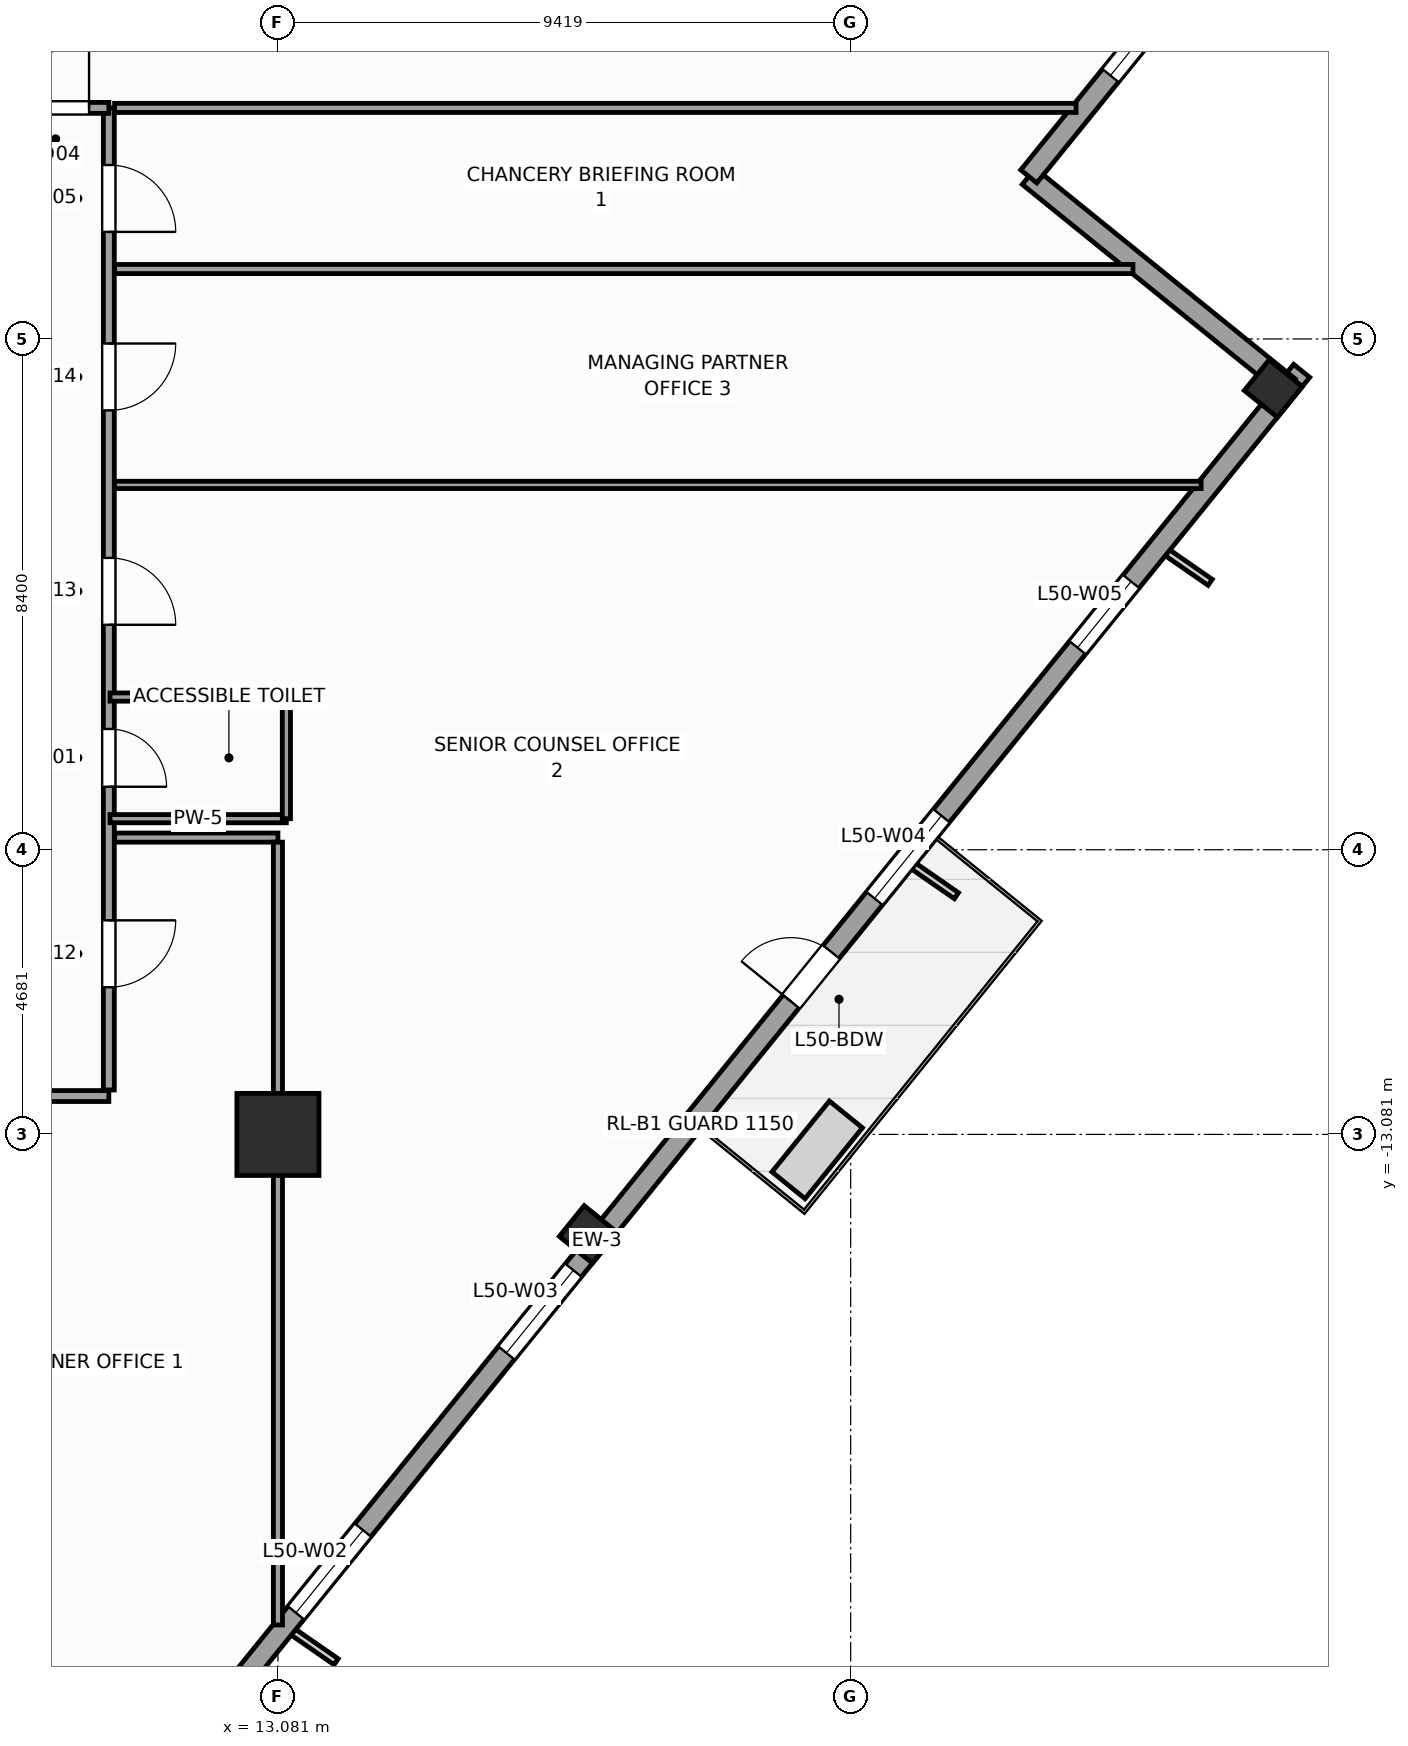
"""IFC4 building model, lengths in metres.
Left out: names, types, materials, properties, quantities, classifications, styles, units other than length and angle.
Written with IfcOpenShell. Run it as: python <this file> out.ifc"""

import sys

from ifc_helpers import new_model, si_unit, direction, frame, frame_2d, origin, origin_2d, place, context, subcontext, project, spatial, rectangle, extrude, source, transform, mapped, element, fill, save


model = new_model("IFC4")
c1 = context("Model", 3, precision=1e-05, world=origin(), true_north=direction((0.0, 1.0)))
c2 = subcontext(c1, "Body", "Model", "MODEL_VIEW")
j1 = project(units=[si_unit("LENGTHUNIT", "METRE"), si_unit("PLANEANGLEUNIT", "RADIAN")], contexts=[c1])
p1 = place(None, origin())
s1 = spatial("IfcSite", under=j1, at=p1, CompositionType="ELEMENT")
p2 = place(p1, origin())
s2 = spatial("IfcBuilding", under=s1, at=p2, CompositionType="ELEMENT")
p3 = place(p2, frame((0.0, 0.0, 209.5)))
s3 = spatial("IfcBuildingStorey", under=s2, at=p3, CompositionType="ELEMENT", Elevation=209.5)
m1 = source(origin(), c2, "Body", "SweptSolid", [
    extrude(rectangle(XDim=1.35, YDim=1.35, at=origin_2d()), origin(), (0.0, 0.0, 1.0), 3.9),
])
p4 = place(p3, frame((13.081, -13.081, 0.0), z_axis=(0.0, 0.0, 1.0), x_axis=(1.0, 0.0, 0.0)))
e1 = element("IfcColumn", 1, at=p4, inside=s3, PredefinedType="COLUMN", context=c2, shape_type="MappedRepresentation", body=[
    mapped(m1, transform((0.0, 0.0, 0.0), scale=1.0)),
])
m2 = source(origin(), c2, "Body", "SweptSolid", [
    extrude(rectangle(XDim=0.65, YDim=0.7, at=origin_2d()), origin(), (0.0, 0.0, 1.0), 3.9),
])
for number, where, z_axis, x_axis in (
    (2, (18.185, -14.726, 0.0), (0.0, 0.0, 1.0), (0.629, 0.777, 0.0)),
    (3, (29.45, -0.815, 0.0), (0.0, 0.0, 1.0), (0.629, 0.777, 0.0)),
):
    element("IfcColumn", number, at=place(p3, frame(where, z_axis=z_axis, x_axis=x_axis)), inside=s3, PredefinedType="COLUMN", context=c2, shape_type="MappedRepresentation", body=[
        mapped(m2, transform((0.0, 0.0, 0.0), scale=1.0)),
    ])
p5 = place(p3, frame((6.733, -29.154, 0.0), z_axis=(0.0, 0.0, 1.0), x_axis=(0.629325378072, 0.77714192302, 0.0)))
e4 = element("IfcWall", 4, at=p5, inside=s3, PredefinedType="STANDARD", context=c2, shape_type="SweptSolid", body=[
    extrude(rectangle(XDim=36.84, YDim=0.34, at=frame_2d((18.42, 0.0))), origin(), (0.0, 0.0, 1.0), 2.96),
])
p6 = place(p5, frame((23.495, 0.0, 0.0)))
e5 = element("IfcOpeningElement", 5, at=p6, cuts=e4, PredefinedType="OPENING", context=c2, shape_type="SweptSolid", body=[
    extrude(rectangle(XDim=1.05, YDim=2.25, at=frame_2d((0.525, 1.125))), frame((0.0, 0.18, 0.0), z_axis=(0.0, -1.0, 0.0), x_axis=(1.0, 0.0, 0.0)), (0.0, 0.0, 1.0), 0.36),
])
p7 = place(p5, frame((3.721, 0.0, 0.48)))
e6 = element("IfcOpeningElement", 6, at=p7, cuts=e4, PredefinedType="OPENING", context=c2, shape_type="SweptSolid", body=[
    extrude(rectangle(XDim=1.4, YDim=2.4, at=frame_2d((0.7, 1.2))), frame((0.0, 0.18, 0.0), z_axis=(0.0, -1.0, 0.0), x_axis=(1.0, 0.0, 0.0)), (0.0, 0.0, 1.0), 0.36),
])
p8 = place(p5, frame((10.559, 0.0, 0.58)))
e7 = element("IfcOpeningElement", 7, at=p8, cuts=e4, PredefinedType="OPENING", context=c2, shape_type="SweptSolid", body=[
    extrude(rectangle(XDim=1.75, YDim=2.3, at=frame_2d((0.875, 1.15))), frame((0.0, 0.18, 0.0), z_axis=(0.0, -1.0, 0.0), x_axis=(1.0, 0.0, 0.0)), (0.0, 0.0, 1.0), 0.36),
])
p9 = place(p5, frame((16.058, 0.0, 0.58)))
e8 = element("IfcOpeningElement", 8, at=p9, cuts=e4, PredefinedType="OPENING", context=c2, shape_type="SweptSolid", body=[
    extrude(rectangle(XDim=1.75, YDim=2.3, at=frame_2d((0.875, 1.15))), frame((0.0, 0.18, 0.0), z_axis=(0.0, -1.0, 0.0), x_axis=(1.0, 0.0, 0.0)), (0.0, 0.0, 1.0), 0.36),
])
p10 = place(p5, frame((25.676, 0.0, 0.58)))
e9 = element("IfcOpeningElement", 9, at=p10, cuts=e4, PredefinedType="OPENING", context=c2, shape_type="SweptSolid", body=[
    extrude(rectangle(XDim=1.75, YDim=2.3, at=frame_2d((0.875, 1.15))), frame((0.0, 0.18, 0.0), z_axis=(0.0, -1.0, 0.0), x_axis=(1.0, 0.0, 0.0)), (0.0, 0.0, 1.0), 0.36),
])
p11 = place(p5, frame((30.982, 0.0, 0.48)))
e10 = element("IfcOpeningElement", 10, at=p11, cuts=e4, PredefinedType="OPENING", context=c2, shape_type="SweptSolid", body=[
    extrude(rectangle(XDim=1.4, YDim=2.4, at=frame_2d((0.7, 1.2))), frame((0.0, 0.18, 0.0), z_axis=(0.0, -1.0, 0.0), x_axis=(1.0, 0.0, 0.0)), (0.0, 0.0, 1.0), 0.36),
])
p12 = place(p3, frame((29.703, -0.789, 0.0), z_axis=(0.0, 0.0, 1.0), x_axis=(-0.77714355312, 0.629323365087, 0.0)))
e11 = element("IfcWall", 11, at=p12, inside=s3, PredefinedType="STANDARD", context=c2, shape_type="SweptSolid", body=[
    extrude(rectangle(XDim=5.5, YDim=0.34, at=frame_2d((2.75, 0.0))), origin(), (0.0, 0.0, 1.0), 3.66),
])
p13 = place(p3, frame((25.429, 2.673, 0.0), z_axis=(0.0, 0.0, 1.0), x_axis=(0.629299794138, 0.777162640055, 0.0)))
e12 = element("IfcWall", 12, at=p13, inside=s3, PredefinedType="STANDARD", context=c2, shape_type="SweptSolid", body=[
    extrude(rectangle(XDim=5.67, YDim=0.34, at=frame_2d((2.835, 0.0))), origin(), (0.0, 0.0, 1.0), 3.66),
])
p14 = place(p13, frame((2.135, 0.0, 0.48)))
e13 = element("IfcOpeningElement", 13, at=p14, cuts=e12, PredefinedType="OPENING", context=c2, shape_type="SweptSolid", body=[
    extrude(rectangle(XDim=1.4, YDim=2.4, at=frame_2d((0.7, 1.2))), frame((0.0, 0.18, 0.0), z_axis=(0.0, -1.0, 0.0), x_axis=(1.0, 0.0, 0.0)), (0.0, 0.0, 1.0), 0.36),
])
p15 = place(p3, frame((-11.45, -12.45, 0.0), z_axis=(0.0, 0.0, 1.0), x_axis=(1.0, 0.0, 0.0)))
e14 = element("IfcWall", 14, at=p15, inside=s3, PredefinedType="PARTITIONING", context=c2, shape_type="SweptSolid", body=[
    extrude(rectangle(XDim=21.75, YDim=0.18, at=frame_2d((10.875, 0.0))), origin(), (0.0, 0.0, 1.0), 3.66),
])
p16 = place(p15, frame((5.411, 0.0, 0.0)))
e15 = element("IfcOpeningElement", 15, at=p16, cuts=e14, PredefinedType="OPENING", context=c2, shape_type="SweptSolid", body=[
    extrude(rectangle(XDim=0.95, YDim=2.1, at=frame_2d((0.475, 1.05))), frame((0.0, 0.1, 0.0), z_axis=(0.0, -1.0, 0.0), x_axis=(1.0, 0.0, 0.0)), (0.0, 0.0, 1.0), 0.2),
])
p17 = place(p15, frame((1.839, 0.0, 0.0)))
e16 = element("IfcOpeningElement", 16, at=p17, cuts=e14, PredefinedType="OPENING", context=c2, shape_type="SweptSolid", body=[
    extrude(rectangle(XDim=1.1, YDim=2.2, at=frame_2d((0.55, 1.1))), frame((0.0, 0.1, 0.0), z_axis=(0.0, -1.0, 0.0), x_axis=(1.0, 0.0, 0.0)), (0.0, 0.0, 1.0), 0.2),
])
p18 = place(p15, frame((7.574, 0.0, 0.0)))
e17 = element("IfcOpeningElement", 17, at=p18, cuts=e14, PredefinedType="OPENING", context=c2, shape_type="SweptSolid", body=[
    extrude(rectangle(XDim=1.1, YDim=2.2, at=frame_2d((0.55, 1.1))), frame((0.0, 0.1, 0.0), z_axis=(0.0, -1.0, 0.0), x_axis=(1.0, 0.0, 0.0)), (0.0, 0.0, 1.0), 0.2),
])
p19 = place(p15, frame((11.05, 0.0, 0.0)))
e18 = element("IfcOpeningElement", 18, at=p19, cuts=e14, PredefinedType="OPENING", context=c2, shape_type="SweptSolid", body=[
    extrude(rectangle(XDim=1.1, YDim=2.2, at=frame_2d((0.55, 1.1))), frame((0.0, 0.1, 0.0), z_axis=(0.0, -1.0, 0.0), x_axis=(1.0, 0.0, 0.0)), (0.0, 0.0, 1.0), 0.2),
])
p20 = place(p15, frame((15.65, 0.0, 0.0)))
e19 = element("IfcOpeningElement", 19, at=p20, cuts=e14, PredefinedType="OPENING", context=c2, shape_type="SweptSolid", body=[
    extrude(rectangle(XDim=1.1, YDim=2.2, at=frame_2d((0.55, 1.1))), frame((0.0, 0.1, 0.0), z_axis=(0.0, -1.0, 0.0), x_axis=(1.0, 0.0, 0.0)), (0.0, 0.0, 1.0), 0.2),
])
p21 = place(p3, frame((10.3, -12.35, 0.0), z_axis=(0.0, 0.0, 1.0), x_axis=(0.0, 1.0, 0.0)))
e20 = element("IfcWall", 20, at=p21, inside=s3, PredefinedType="PARTITIONING", context=c2, shape_type="SweptSolid", body=[
    extrude(rectangle(XDim=16.15, YDim=0.18, at=frame_2d((8.075, 0.0))), origin(), (0.0, 0.0, 1.0), 3.66),
])
p22 = place(p21, frame((4.986, 0.0, 0.0)))
e21 = element("IfcOpeningElement", 21, at=p22, cuts=e20, PredefinedType="OPENING", context=c2, shape_type="SweptSolid", body=[
    extrude(rectangle(XDim=0.95, YDim=2.1, at=frame_2d((0.475, 1.05))), frame((0.0, 0.1, 0.0), z_axis=(0.0, -1.0, 0.0), x_axis=(1.0, 0.0, 0.0)), (0.0, 0.0, 1.0), 0.2),
])
p23 = place(p21, frame((14.111, 0.0, 0.0)))
e22 = element("IfcOpeningElement", 22, at=p23, cuts=e20, PredefinedType="OPENING", context=c2, shape_type="SweptSolid", body=[
    extrude(rectangle(XDim=1.1, YDim=2.2, at=frame_2d((0.55, 1.1))), frame((0.0, 0.1, 0.0), z_axis=(0.0, -1.0, 0.0), x_axis=(1.0, 0.0, 0.0)), (0.0, 0.0, 1.0), 0.2),
])
p24 = place(p21, frame((1.689, 0.0, 0.0)))
e23 = element("IfcOpeningElement", 23, at=p24, cuts=e20, PredefinedType="OPENING", context=c2, shape_type="SweptSolid", body=[
    extrude(rectangle(XDim=1.1, YDim=2.2, at=frame_2d((0.55, 1.1))), frame((0.0, 0.1, 0.0), z_axis=(0.0, -1.0, 0.0), x_axis=(1.0, 0.0, 0.0)), (0.0, 0.0, 1.0), 0.2),
])
p25 = place(p21, frame((7.65, 0.0, 0.0)))
e24 = element("IfcOpeningElement", 24, at=p25, cuts=e20, PredefinedType="OPENING", context=c2, shape_type="SweptSolid", body=[
    extrude(rectangle(XDim=1.1, YDim=2.2, at=frame_2d((0.55, 1.1))), frame((0.0, 0.1, 0.0), z_axis=(0.0, -1.0, 0.0), x_axis=(1.0, 0.0, 0.0)), (0.0, 0.0, 1.0), 0.2),
])
p26 = place(p21, frame((11.175, 0.0, 0.0)))
e25 = element("IfcOpeningElement", 25, at=p26, cuts=e20, PredefinedType="OPENING", context=c2, shape_type="SweptSolid", body=[
    extrude(rectangle(XDim=1.1, YDim=2.2, at=frame_2d((0.55, 1.1))), frame((0.0, 0.1, 0.0), z_axis=(0.0, -1.0, 0.0), x_axis=(1.0, 0.0, 0.0)), (0.0, 0.0, 1.0), 0.2),
])
p27 = place(p3, frame((8.55, 3.8, 0.0), z_axis=(0.0, 0.0, 1.0), x_axis=(1.0, 0.0, 0.0)))
e26 = element("IfcWall", 26, at=p27, inside=s3, PredefinedType="PARTITIONING", context=c2, shape_type="SweptSolid", body=[
    extrude(rectangle(XDim=1.75, YDim=0.18, at=frame_2d((0.875, 0.0))), origin(), (0.0, 0.0, 1.0), 3.66),
])
p28 = place(p27, frame((0.325, 0.0, 0.0)))
e27 = element("IfcOpeningElement", 27, at=p28, cuts=e26, PredefinedType="OPENING", context=c2, shape_type="SweptSolid", body=[
    extrude(rectangle(XDim=1.1, YDim=2.2, at=frame_2d((0.55, 1.1))), frame((0.0, 0.1, 0.0), z_axis=(0.0, -1.0, 0.0), x_axis=(1.0, 0.0, 0.0)), (0.0, 0.0, 1.0), 0.2),
])
p29 = place(p3, frame((10.395, 1.15, 0.0), z_axis=(0.0, 0.0, 1.0), x_axis=(1.0, 0.0, 0.0)))
e28 = element("IfcWall", 28, at=p29, inside=s3, PredefinedType="PARTITIONING", context=c2, shape_type="SweptSolid", body=[
    extrude(rectangle(XDim=16.747, YDim=0.15, at=frame_2d((8.374, 0.0))), origin(), (0.0, 0.0, 1.0), 3.66),
])
p30 = place(p3, frame((10.395, 3.8, 0.0), z_axis=(0.0, 0.0, 1.0), x_axis=(1.0, 0.0, 0.0)))
e29 = element("IfcWall", 29, at=p30, inside=s3, PredefinedType="PARTITIONING", context=c2, shape_type="SweptSolid", body=[
    extrude(rectangle(XDim=15.812, YDim=0.15, at=frame_2d((7.906, 0.0))), origin(), (0.0, 0.0, 1.0), 3.66),
])
p31 = place(p3, frame((10.395, -8.2, 0.0), z_axis=(0.0, 0.0, 1.0), x_axis=(1.0, 0.0, 0.0)))
e30 = element("IfcWall", 30, at=p31, inside=s3, PredefinedType="PARTITIONING", context=c2, shape_type="SweptSolid", body=[
    extrude(rectangle(XDim=2.686, YDim=0.15, at=frame_2d((1.343, 0.0))), origin(), (0.0, 0.0, 1.0), 3.66),
])
p32 = place(p3, frame((13.081, -8.275, 0.0), z_axis=(0.0, 0.0, 1.0), x_axis=(0.0, -1.0, 0.0)))
e31 = element("IfcWall", 31, at=p32, inside=s3, PredefinedType="PARTITIONING", context=c2, shape_type="SweptSolid", body=[
    extrude(rectangle(XDim=12.874, YDim=0.15, at=frame_2d((6.437, 0.0))), origin(), (0.0, 0.0, 1.0), 2.76),
])
p33 = place(p3, frame((10.395, -2.4, 0.0), z_axis=(0.0, 0.0, 1.0), x_axis=(1.0, 0.0, 0.0)))
e32 = element("IfcWall", 32, at=p33, inside=s3, PredefinedType="PARTITIONING", context=c2, shape_type="SweptSolid", body=[
    extrude(rectangle(XDim=17.868, YDim=0.12, at=frame_2d((8.934, 0.0))), origin(), (0.0, 0.0, 1.0), 3.66),
])
p34 = place(p3, frame((10.32, -7.889, 0.0), z_axis=(0.0, 0.0, 1.0), x_axis=(1.0, 0.0, 0.0)))
e33 = element("IfcWall", 33, at=p34, inside=s3, PredefinedType="PARTITIONING", context=c2, shape_type="SweptSolid", body=[
    extrude(rectangle(XDim=2.9, YDim=0.135, at=frame_2d((1.45, 0.0))), origin(), (0.0, 0.0, 1.0), 3.66),
])
p35 = place(p3, frame((13.22, -7.889, 0.0), z_axis=(0.0, 0.0, 1.0), x_axis=(0.0, 1.0, 0.0)))
e34 = element("IfcWall", 34, at=p35, inside=s3, PredefinedType="PARTITIONING", context=c2, shape_type="SweptSolid", body=[
    extrude(rectangle(XDim=2.0, YDim=0.135, at=frame_2d((1.0, 0.0))), origin(), (0.0, 0.0, 1.0), 2.76),
])
p36 = place(p3, frame((10.32, -5.889, 0.0), z_axis=(0.0, 0.0, 1.0), x_axis=(1.0, 0.0, 0.0)))
e35 = element("IfcWall", 35, at=p36, inside=s3, PredefinedType="PARTITIONING", context=c2, shape_type="SweptSolid", body=[
    extrude(rectangle(XDim=2.9, YDim=0.135, at=frame_2d((1.45, 0.0))), origin(), (0.0, 0.0, 1.0), 3.66),
])
m3 = source(origin(), c2, "Body", "SweptSolid", [
    extrude(rectangle(XDim=1.05, YDim=2.25, at=frame_2d((0.525, 1.125))), frame((0.0, 0.025, 0.0), z_axis=(0.0, -1.0, 0.0), x_axis=(1.0, 0.0, 0.0)), (0.0, 0.0, 1.0), 0.05),
])
p37 = place(p6, origin())
e36 = element("IfcDoor", 36, at=p37, inside=s3, OperationType="SINGLE_SWING_LEFT", PredefinedType="DOOR", context=c2, shape_type="MappedRepresentation", body=[
    mapped(m3, transform((0.0, 0.0, 0.0), scale=1.0)),
])
fill(e5, e36)
m4 = source(origin(), c2, "Body", "SweptSolid", [
    extrude(rectangle(XDim=1.75, YDim=2.3, at=frame_2d((0.875, 1.15))), frame((0.0, 0.03, 0.0), z_axis=(0.0, -1.0, 0.0), x_axis=(1.0, 0.0, 0.0)), (0.0, 0.0, 1.0), 0.06),
])
p38 = place(p8, origin())
e37 = element("IfcWindow", 37, at=p38, inside=s3, PartitioningType="SINGLE_PANEL", PredefinedType="WINDOW", context=c2, shape_type="MappedRepresentation", body=[
    mapped(m4, transform((0.0, 0.0, 0.0), scale=1.0)),
])
fill(e7, e37)
p39 = place(p9, origin())
e38 = element("IfcWindow", 38, at=p39, inside=s3, PartitioningType="SINGLE_PANEL", PredefinedType="WINDOW", context=c2, shape_type="MappedRepresentation", body=[
    mapped(m4, transform((0.0, 0.0, 0.0), scale=1.0)),
])
fill(e8, e38)
p40 = place(p10, origin())
e39 = element("IfcWindow", 39, at=p40, inside=s3, PartitioningType="SINGLE_PANEL", PredefinedType="WINDOW", context=c2, shape_type="MappedRepresentation", body=[
    mapped(m4, transform((0.0, 0.0, 0.0), scale=1.0)),
])
fill(e9, e39)
m5 = source(origin(), c2, "Body", "SweptSolid", [
    extrude(rectangle(XDim=1.4, YDim=2.4, at=frame_2d((0.7, 1.2))), frame((0.0, 0.03, 0.0), z_axis=(0.0, -1.0, 0.0), x_axis=(1.0, 0.0, 0.0)), (0.0, 0.0, 1.0), 0.06),
])
p41 = place(p11, origin())
e40 = element("IfcWindow", 40, at=p41, inside=s3, PartitioningType="SINGLE_PANEL", PredefinedType="WINDOW", context=c2, shape_type="MappedRepresentation", body=[
    mapped(m5, transform((0.0, 0.0, 0.0), scale=1.0)),
])
fill(e10, e40)
p42 = place(p14, origin())
e41 = element("IfcWindow", 41, at=p42, inside=s3, PartitioningType="SINGLE_PANEL", PredefinedType="WINDOW", context=c2, shape_type="MappedRepresentation", body=[
    mapped(m5, transform((0.0, 0.0, 0.0), scale=1.0)),
])
fill(e13, e41)
m6 = source(origin(), c2, "Body", "SweptSolid", [
    extrude(rectangle(XDim=0.95, YDim=2.1, at=frame_2d((0.475, 1.05))), frame((0.0, 0.025, 0.0), z_axis=(0.0, -1.0, 0.0), x_axis=(1.0, 0.0, 0.0)), (0.0, 0.0, 1.0), 0.05),
])
p43 = place(p22, frame((0.95, 0.0, 0.0), z_axis=(0.0, 0.0, 1.0), x_axis=(-1.0, 0.0, 0.0)))
e42 = element("IfcDoor", 42, at=p43, inside=s3, OperationType="SINGLE_SWING_LEFT", PredefinedType="DOOR", context=c2, shape_type="MappedRepresentation", body=[
    mapped(m6, transform((0.0, 0.0, 0.0), scale=1.0)),
])
fill(e21, e42)
m7 = source(origin(), c2, "Body", "SweptSolid", [
    extrude(rectangle(XDim=1.1, YDim=2.2, at=frame_2d((0.55, 1.1))), frame((0.0, 0.025, 0.0), z_axis=(0.0, -1.0, 0.0), x_axis=(1.0, 0.0, 0.0)), (0.0, 0.0, 1.0), 0.05),
])
p44 = place(p28, origin())
e43 = element("IfcDoor", 43, at=p44, inside=s3, OperationType="SINGLE_SWING_RIGHT", PredefinedType="DOOR", context=c2, shape_type="MappedRepresentation", body=[
    mapped(m7, transform((0.0, 0.0, 0.0), scale=1.0)),
])
fill(e27, e43)
p45 = place(p23, frame((1.1, 0.0, 0.0), z_axis=(0.0, 0.0, 1.0), x_axis=(-1.0, 0.0, 0.0)))
e44 = element("IfcDoor", 44, at=p45, inside=s3, OperationType="SINGLE_SWING_LEFT", PredefinedType="DOOR", context=c2, shape_type="MappedRepresentation", body=[
    mapped(m7, transform((0.0, 0.0, 0.0), scale=1.0)),
])
fill(e22, e44)
p46 = place(p24, frame((1.1, 0.0, 0.0), z_axis=(0.0, 0.0, 1.0), x_axis=(-1.0, 0.0, 0.0)))
e45 = element("IfcDoor", 45, at=p46, inside=s3, OperationType="SINGLE_SWING_RIGHT", PredefinedType="DOOR", context=c2, shape_type="MappedRepresentation", body=[
    mapped(m7, transform((0.0, 0.0, 0.0), scale=1.0)),
])
fill(e23, e45)
p47 = place(p25, frame((1.1, 0.0, 0.0), z_axis=(0.0, 0.0, 1.0), x_axis=(-1.0, 0.0, 0.0)))
e46 = element("IfcDoor", 46, at=p47, inside=s3, OperationType="SINGLE_SWING_LEFT", PredefinedType="DOOR", context=c2, shape_type="MappedRepresentation", body=[
    mapped(m7, transform((0.0, 0.0, 0.0), scale=1.0)),
])
fill(e24, e46)
p48 = place(p26, frame((1.1, 0.0, 0.0), z_axis=(0.0, 0.0, 1.0), x_axis=(-1.0, 0.0, 0.0)))
e47 = element("IfcDoor", 47, at=p48, inside=s3, OperationType="SINGLE_SWING_RIGHT", PredefinedType="DOOR", context=c2, shape_type="MappedRepresentation", body=[
    mapped(m7, transform((0.0, 0.0, 0.0), scale=1.0)),
])
fill(e25, e47)
save(model, sys.argv[1])
